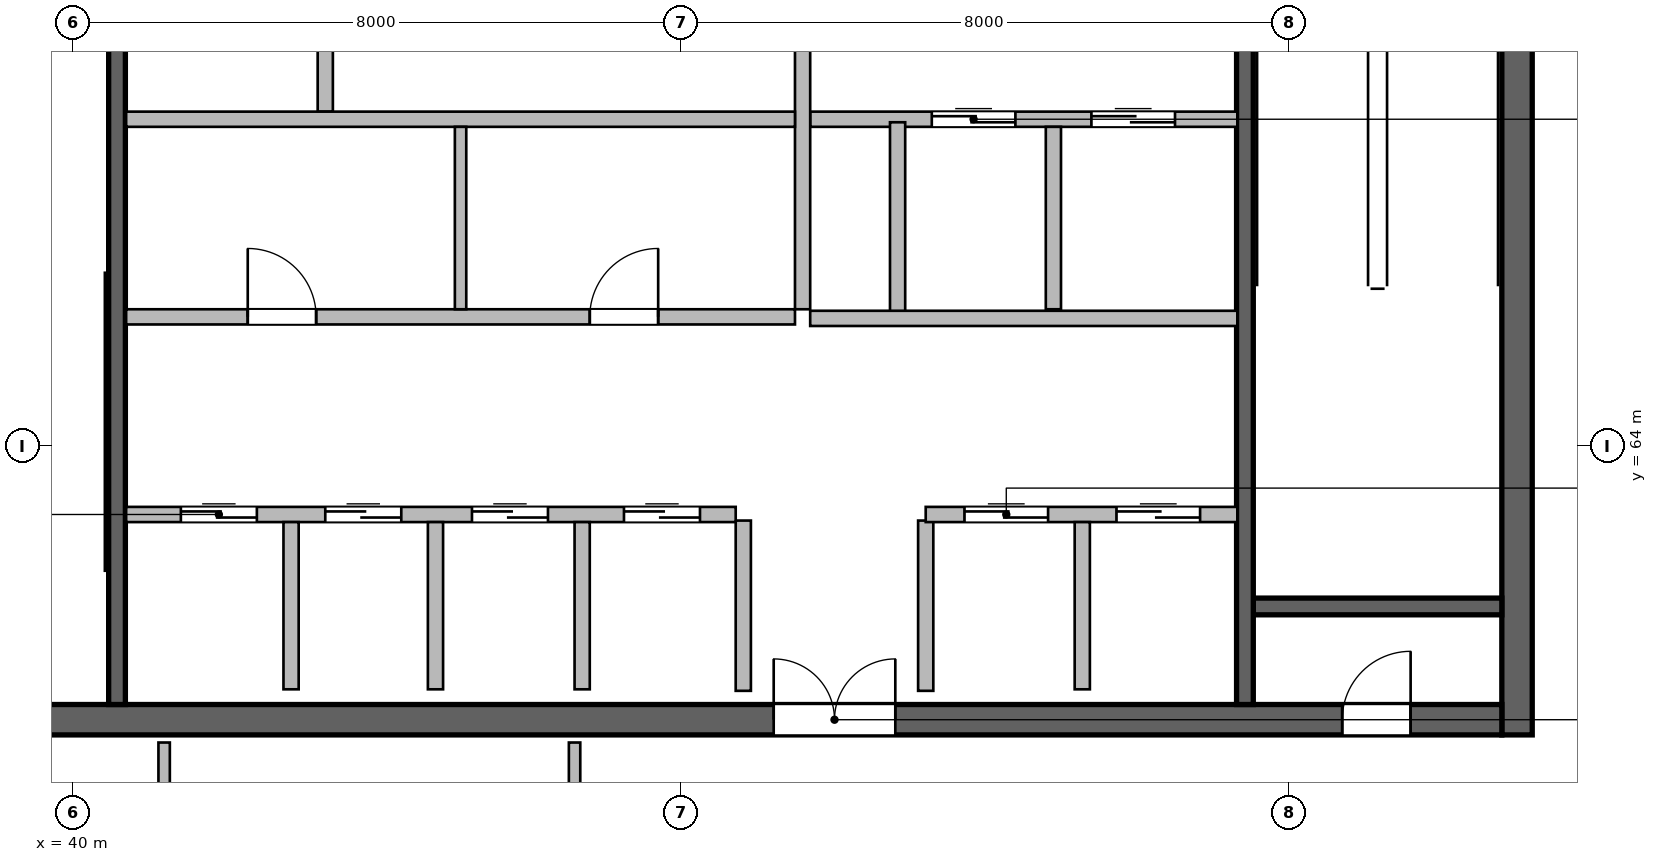
"""IFC4 building model, lengths in metres.
Left out: names, types, materials, properties, quantities, classifications, styles, units other than length and angle.
Written with IfcOpenShell. Run it as: python <this file> out.ifc"""

import sys

from ifc_helpers import new_model, si_unit, direction, frame, frame_2d, origin, place, context, subcontext, project, spatial, rectangle, extrude, source, transform, mapped, element, fill, save


model = new_model("IFC4")
c1 = context("Model", 3, precision=1e-05, world=origin(), true_north=direction((0.0, 1.0)))
c2 = subcontext(c1, "Body", "Model", "MODEL_VIEW")
j1 = project(units=[si_unit("LENGTHUNIT", "METRE"), si_unit("PLANEANGLEUNIT", "RADIAN")], contexts=[c1])
p1 = place(None, origin())
s1 = spatial("IfcSite", under=j1, at=p1, CompositionType="ELEMENT")
p2 = place(p1, origin())
s2 = spatial("IfcBuilding", under=s1, at=p2, CompositionType="ELEMENT")
p3 = place(p2, frame((0.0, 0.0, 312.6)))
s3 = spatial("IfcBuildingStorey", under=s2, at=p3, CompositionType="ELEMENT", Elevation=312.6)
m1 = source(origin(), c2, "Body", "SweptSolid", [
    extrude(rectangle(XDim=12.0, YDim=0.4, at=frame_2d((6.0, 0.0))), origin(), (0.0, 0.0, 1.0), 5.4),
])
p4 = place(p3, frame((59.0, 60.2, 0.0), z_axis=(0.0, 0.0, 1.0), x_axis=(0.0, 1.0, 0.0)))
e1 = element("IfcWall", 1, at=p4, inside=s3, PredefinedType="SHEAR", context=c2, shape_type="MappedRepresentation", body=[
    mapped(m1, transform((0.0, 0.0, 0.0), scale=1.0)),
])
m2 = source(origin(), c2, "Body", "SweptSolid", [
    extrude(rectangle(XDim=21.6, YDim=0.4, at=frame_2d((10.8, 0.0))), origin(), (0.0, 0.0, 1.0), 5.4),
])
p5 = place(p3, frame((37.2, 60.4, 0.0), z_axis=(0.0, 0.0, 1.0), x_axis=(1.0, 0.0, 0.0)))
e2 = element("IfcWall", 2, at=p5, inside=s3, PredefinedType="SHEAR", context=c2, shape_type="MappedRepresentation", body=[
    mapped(m2, transform((0.0, 0.0, 0.0), scale=1.0)),
])
p6 = place(p5, frame((1.1, 0.0, 0.0)))
e3 = element("IfcOpeningElement", 3, at=p6, cuts=e2, PredefinedType="OPENING", context=c2, shape_type="SweptSolid", body=[
    extrude(rectangle(XDim=1.15, YDim=2.15, at=frame_2d((0.575, 1.075))), frame((0.0, 0.21, 0.0), z_axis=(0.0, -1.0, 0.0), x_axis=(1.0, 0.0, 0.0)), (0.0, 0.0, 1.0), 0.42),
])
p7 = place(p5, frame((19.5, 0.0, 0.0)))
e4 = element("IfcOpeningElement", 4, at=p7, cuts=e2, PredefinedType="OPENING", context=c2, shape_type="SweptSolid", body=[
    extrude(rectangle(XDim=0.9, YDim=2.1, at=frame_2d((0.45, 1.05))), frame((0.0, 0.21, 0.0), z_axis=(0.0, -1.0, 0.0), x_axis=(1.0, 0.0, 0.0)), (0.0, 0.0, 1.0), 0.42),
])
p8 = place(p5, frame((12.02, 0.0, 0.0)))
e5 = element("IfcOpeningElement", 5, at=p8, cuts=e2, PredefinedType="OPENING", context=c2, shape_type="SweptSolid", body=[
    extrude(rectangle(XDim=1.6, YDim=2.15, at=frame_2d((0.8, 1.075))), frame((0.0, 0.21, 0.0), z_axis=(0.0, -1.0, 0.0), x_axis=(1.0, 0.0, 0.0)), (0.0, 0.0, 1.0), 0.42),
])
m3 = source(origin(), c2, "Body", "SweptSolid", [
    extrude(rectangle(XDim=3.27, YDim=0.22, at=frame_2d((1.635, 0.0))), origin(), (0.0, 0.0, 1.0), 5.4),
])
p9 = place(p3, frame((55.53, 61.89, 0.0), z_axis=(0.0, 0.0, 1.0), x_axis=(1.0, 0.0, 0.0)))
e6 = element("IfcWall", 6, at=p9, inside=s3, PredefinedType="SHEAR", context=c2, shape_type="MappedRepresentation", body=[
    mapped(m3, transform((0.0, 0.0, 0.0), scale=1.0)),
])
m4 = source(origin(), c2, "Body", "SweptSolid", [
    extrude(rectangle(XDim=11.2, YDim=0.22, at=frame_2d((5.6, 0.0))), origin(), (0.0, 0.0, 1.0), 5.4),
])
p10 = place(p3, frame((40.58, 60.6, 0.0), z_axis=(0.0, 0.0, 1.0), x_axis=(0.0, 1.0, 0.0)))
e7 = element("IfcWall", 7, at=p10, inside=s3, PredefinedType="SHEAR", context=c2, shape_type="MappedRepresentation", body=[
    mapped(m4, transform((0.0, 0.0, 0.0), scale=1.0)),
])
p11 = place(p3, frame((55.42, 60.6, 0.0), z_axis=(0.0, 0.0, 1.0), x_axis=(0.0, 1.0, 0.0)))
e8 = element("IfcWall", 8, at=p11, inside=s3, PredefinedType="SHEAR", context=c2, shape_type="MappedRepresentation", body=[
    mapped(m4, transform((0.0, 0.0, 0.0), scale=1.0)),
])
p12 = place(p11, frame((9.645, 0.0, 0.0)))
e9 = element("IfcOpeningElement", 9, at=p12, cuts=e8, PredefinedType="OPENING", context=c2, shape_type="SweptSolid", body=[
    extrude(rectangle(XDim=1.15, YDim=2.15, at=frame_2d((0.575, 1.075))), frame((0.0, 0.12, 0.0), z_axis=(0.0, -1.0, 0.0), x_axis=(1.0, 0.0, 0.0)), (0.0, 0.0, 1.0), 0.24),
])
m5 = source(origin(), c2, "Body", "SweptSolid", [
    extrude(rectangle(XDim=2.24, YDim=0.2, at=frame_2d((1.12, 0.0))), origin(), (0.0, 0.0, 1.0), 5.12),
])
for number, where, z_axis, x_axis in (
    (10, (48.82, 60.78, 0.0), (0.0, 0.0, 1.0), (0.0, 1.0, 0.0)),
    (11, (51.22, 60.78, 0.0), (0.0, 0.0, 1.0), (0.0, 1.0, 0.0)),
):
    element("IfcWall", number, at=place(p3, frame(where, z_axis=z_axis, x_axis=x_axis)), inside=s3, PredefinedType="SOLIDWALL", context=c2, shape_type="MappedRepresentation", body=[
        mapped(m5, transform((0.0, 0.0, 0.0), scale=1.0)),
    ])
m6 = source(origin(), c2, "Body", "SweptSolid", [
    extrude(rectangle(XDim=5.62, YDim=0.2, at=frame_2d((2.81, 0.0))), origin(), (0.0, 0.0, 1.0), 5.12),
])
p13 = place(p3, frame((49.7, 68.3, 0.0), z_axis=(0.0, 0.0, 1.0), x_axis=(1.0, 0.0, 0.0)))
e12 = element("IfcWall", 12, at=p13, inside=s3, PredefinedType="SOLIDWALL", context=c2, shape_type="MappedRepresentation", body=[
    mapped(m6, transform((0.0, 0.0, 0.0), scale=1.0)),
])
p14 = place(p13, frame((1.6, 0.0, 0.0)))
e13 = element("IfcOpeningElement", 13, at=p14, cuts=e12, PredefinedType="OPENING", context=c2, shape_type="SweptSolid", body=[
    extrude(rectangle(XDim=1.1, YDim=2.15, at=frame_2d((0.55, 1.075))), frame((0.0, 0.11, 0.0), z_axis=(0.0, -1.0, 0.0), x_axis=(1.0, 0.0, 0.0)), (0.0, 0.0, 1.0), 0.22),
])
p15 = place(p13, frame((3.7, 0.0, 0.0)))
e14 = element("IfcOpeningElement", 14, at=p15, cuts=e12, PredefinedType="OPENING", context=c2, shape_type="SweptSolid", body=[
    extrude(rectangle(XDim=1.1, YDim=2.15, at=frame_2d((0.55, 1.075))), frame((0.0, 0.11, 0.0), z_axis=(0.0, -1.0, 0.0), x_axis=(1.0, 0.0, 0.0)), (0.0, 0.0, 1.0), 0.22),
])
m7 = source(origin(), c2, "Body", "SweptSolid", [
    extrude(rectangle(XDim=5.8, YDim=0.2, at=frame_2d((2.9, 0.0))), origin(), (0.0, 0.0, 1.0), 5.12),
])
p16 = place(p3, frame((49.6, 65.8, 0.0), z_axis=(0.0, 0.0, 1.0), x_axis=(0.0, 1.0, 0.0)))
e15 = element("IfcWall", 15, at=p16, inside=s3, PredefinedType="SOLIDWALL", context=c2, shape_type="MappedRepresentation", body=[
    mapped(m7, transform((0.0, 0.0, 0.0), scale=1.0)),
])
m8 = source(origin(), c2, "Body", "SweptSolid", [
    extrude(rectangle(XDim=2.58, YDim=0.2, at=frame_2d((1.29, 0.0))), origin(), (0.0, 0.0, 1.0), 5.12),
])
p17 = place(p3, frame((50.85, 65.68, 0.0), z_axis=(0.0, 0.0, 1.0), x_axis=(0.0, 1.0, 0.0)))
e16 = element("IfcWall", 16, at=p17, inside=s3, PredefinedType="SOLIDWALL", context=c2, shape_type="MappedRepresentation", body=[
    mapped(m8, transform((0.0, 0.0, 0.0), scale=1.0)),
])
m9 = source(origin(), c2, "Body", "SweptSolid", [
    extrude(rectangle(XDim=2.4, YDim=0.2, at=frame_2d((1.2, 0.0))), origin(), (0.0, 0.0, 1.0), 5.12),
])
p18 = place(p3, frame((52.9, 65.8, 0.0), z_axis=(0.0, 0.0, 1.0), x_axis=(0.0, 1.0, 0.0)))
e17 = element("IfcWall", 17, at=p18, inside=s3, PredefinedType="SOLIDWALL", context=c2, shape_type="MappedRepresentation", body=[
    mapped(m9, transform((0.0, 0.0, 0.0), scale=1.0)),
])
p19 = place(p3, frame((49.7, 65.68, 0.0), z_axis=(0.0, 0.0, 1.0), x_axis=(1.0, 0.0, 0.0)))
e18 = element("IfcWall", 18, at=p19, inside=s3, PredefinedType="SOLIDWALL", context=c2, shape_type="MappedRepresentation", body=[
    mapped(m6, transform((0.0, 0.0, 0.0), scale=1.0)),
])
m10 = source(origin(), c2, "Body", "SweptSolid", [
    extrude(rectangle(XDim=3.2, YDim=0.2, at=frame_2d((1.6, 0.0))), origin(), (0.0, 0.0, 1.0), 5.12),
])
p20 = place(p3, frame((43.32, 68.4, 0.0), z_axis=(0.0, 0.0, 1.0), x_axis=(0.0, 1.0, 0.0)))
e19 = element("IfcWall", 19, at=p20, inside=s3, PredefinedType="SOLIDWALL", context=c2, shape_type="MappedRepresentation", body=[
    mapped(m10, transform((0.0, 0.0, 0.0), scale=1.0)),
])
m11 = source(origin(), c2, "Body", "SweptSolid", [
    extrude(rectangle(XDim=8.8, YDim=0.2, at=frame_2d((4.4, 0.0))), origin(), (0.0, 0.0, 1.0), 5.12),
])
p21 = place(p3, frame((40.7, 68.3, 0.0), z_axis=(0.0, 0.0, 1.0), x_axis=(1.0, 0.0, 0.0)))
e20 = element("IfcWall", 20, at=p21, inside=s3, PredefinedType="SOLIDWALL", context=c2, shape_type="MappedRepresentation", body=[
    mapped(m11, transform((0.0, 0.0, 0.0), scale=1.0)),
])
m12 = source(origin(), c2, "Body", "SweptSolid", [
    extrude(rectangle(XDim=8.02, YDim=0.2, at=frame_2d((4.01, 0.0))), origin(), (0.0, 0.0, 1.0), 5.12),
])
p22 = place(p3, frame((40.7, 63.1, 0.0), z_axis=(0.0, 0.0, 1.0), x_axis=(1.0, 0.0, 0.0)))
e21 = element("IfcWall", 21, at=p22, inside=s3, PredefinedType="SOLIDWALL", context=c2, shape_type="MappedRepresentation", body=[
    mapped(m12, transform((0.0, 0.0, 0.0), scale=1.0)),
])
p23 = place(p22, frame((0.72, 0.0, 0.0)))
e22 = element("IfcOpeningElement", 22, at=p23, cuts=e21, PredefinedType="OPENING", context=c2, shape_type="SweptSolid", body=[
    extrude(rectangle(XDim=1.0, YDim=2.15, at=frame_2d((0.5, 1.075))), frame((0.0, 0.11, 0.0), z_axis=(0.0, -1.0, 0.0), x_axis=(1.0, 0.0, 0.0)), (0.0, 0.0, 1.0), 0.22),
])
p24 = place(p22, frame((2.62, 0.0, 0.0)))
e23 = element("IfcOpeningElement", 23, at=p24, cuts=e21, PredefinedType="OPENING", context=c2, shape_type="SweptSolid", body=[
    extrude(rectangle(XDim=1.0, YDim=2.15, at=frame_2d((0.5, 1.075))), frame((0.0, 0.11, 0.0), z_axis=(0.0, -1.0, 0.0), x_axis=(1.0, 0.0, 0.0)), (0.0, 0.0, 1.0), 0.22),
])
p25 = place(p22, frame((4.55, 0.0, 0.0)))
e24 = element("IfcOpeningElement", 24, at=p25, cuts=e21, PredefinedType="OPENING", context=c2, shape_type="SweptSolid", body=[
    extrude(rectangle(XDim=1.0, YDim=2.15, at=frame_2d((0.5, 1.075))), frame((0.0, 0.11, 0.0), z_axis=(0.0, -1.0, 0.0), x_axis=(1.0, 0.0, 0.0)), (0.0, 0.0, 1.0), 0.22),
])
p26 = place(p22, frame((6.55, 0.0, 0.0)))
e25 = element("IfcOpeningElement", 25, at=p26, cuts=e21, PredefinedType="OPENING", context=c2, shape_type="SweptSolid", body=[
    extrude(rectangle(XDim=1.0, YDim=2.15, at=frame_2d((0.5, 1.075))), frame((0.0, 0.11, 0.0), z_axis=(0.0, -1.0, 0.0), x_axis=(1.0, 0.0, 0.0)), (0.0, 0.0, 1.0), 0.22),
])
m13 = source(origin(), c2, "Body", "SweptSolid", [
    extrude(rectangle(XDim=4.1, YDim=0.2, at=frame_2d((2.05, 0.0))), origin(), (0.0, 0.0, 1.0), 5.12),
])
p27 = place(p3, frame((51.22, 63.1, 0.0), z_axis=(0.0, 0.0, 1.0), x_axis=(1.0, 0.0, 0.0)))
e26 = element("IfcWall", 26, at=p27, inside=s3, PredefinedType="SOLIDWALL", context=c2, shape_type="MappedRepresentation", body=[
    mapped(m13, transform((0.0, 0.0, 0.0), scale=1.0)),
])
p28 = place(p27, frame((0.51, 0.0, 0.0)))
e27 = element("IfcOpeningElement", 27, at=p28, cuts=e26, PredefinedType="OPENING", context=c2, shape_type="SweptSolid", body=[
    extrude(rectangle(XDim=1.1, YDim=2.15, at=frame_2d((0.55, 1.075))), frame((0.0, 0.11, 0.0), z_axis=(0.0, -1.0, 0.0), x_axis=(1.0, 0.0, 0.0)), (0.0, 0.0, 1.0), 0.22),
])
p29 = place(p27, frame((2.51, 0.0, 0.0)))
e28 = element("IfcOpeningElement", 28, at=p29, cuts=e26, PredefinedType="OPENING", context=c2, shape_type="SweptSolid", body=[
    extrude(rectangle(XDim=1.1, YDim=2.15, at=frame_2d((0.55, 1.075))), frame((0.0, 0.11, 0.0), z_axis=(0.0, -1.0, 0.0), x_axis=(1.0, 0.0, 0.0)), (0.0, 0.0, 1.0), 0.22),
])
m14 = source(origin(), c2, "Body", "SweptSolid", [
    extrude(rectangle(XDim=2.2, YDim=0.2, at=frame_2d((1.1, 0.0))), origin(), (0.0, 0.0, 1.0), 5.12),
])
for number, where, z_axis, x_axis in (
    (29, (42.87, 60.8, 0.0), (0.0, 0.0, 1.0), (0.0, 1.0, 0.0)),
    (30, (44.77, 60.8, 0.0), (0.0, 0.0, 1.0), (0.0, 1.0, 0.0)),
    (31, (46.7, 60.8, 0.0), (0.0, 0.0, 1.0), (0.0, 1.0, 0.0)),
    (32, (53.28, 60.8, 0.0), (0.0, 0.0, 1.0), (0.0, 1.0, 0.0)),
):
    element("IfcWall", number, at=place(p3, frame(where, z_axis=z_axis, x_axis=x_axis)), inside=s3, PredefinedType="SOLIDWALL", context=c2, shape_type="MappedRepresentation", body=[
        mapped(m14, transform((0.0, 0.0, 0.0), scale=1.0)),
    ])
p30 = place(p3, frame((40.7, 65.7, 0.0), z_axis=(0.0, 0.0, 1.0), x_axis=(1.0, 0.0, 0.0)))
e33 = element("IfcWall", 33, at=p30, inside=s3, PredefinedType="SOLIDWALL", context=c2, shape_type="MappedRepresentation", body=[
    mapped(m11, transform((0.0, 0.0, 0.0), scale=1.0)),
])
p31 = place(p30, frame((1.6, 0.0, 0.0)))
e34 = element("IfcOpeningElement", 34, at=p31, cuts=e33, PredefinedType="OPENING", context=c2, shape_type="SweptSolid", body=[
    extrude(rectangle(XDim=0.9, YDim=2.1, at=frame_2d((0.45, 1.05))), frame((0.0, 0.11, 0.0), z_axis=(0.0, -1.0, 0.0), x_axis=(1.0, 0.0, 0.0)), (0.0, 0.0, 1.0), 0.22),
])
p32 = place(p30, frame((6.1, 0.0, 0.0)))
e35 = element("IfcOpeningElement", 35, at=p32, cuts=e33, PredefinedType="OPENING", context=c2, shape_type="SweptSolid", body=[
    extrude(rectangle(XDim=0.9, YDim=2.1, at=frame_2d((0.45, 1.05))), frame((0.0, 0.11, 0.0), z_axis=(0.0, -1.0, 0.0), x_axis=(1.0, 0.0, 0.0)), (0.0, 0.0, 1.0), 0.22),
])
m15 = source(origin(), c2, "Body", "SweptSolid", [
    extrude(rectangle(XDim=2.4, YDim=0.15, at=frame_2d((1.2, 0.0))), origin(), (0.0, 0.0, 1.0), 5.12),
])
p33 = place(p3, frame((45.1, 65.8, 0.0), z_axis=(0.0, 0.0, 1.0), x_axis=(0.0, 1.0, 0.0)))
e36 = element("IfcWall", 36, at=p33, inside=s3, PredefinedType="PARTITIONING", context=c2, shape_type="MappedRepresentation", body=[
    mapped(m15, transform((0.0, 0.0, 0.0), scale=1.0)),
])
m16 = source(origin(), c2, "Body", "SweptSolid", [
    extrude(rectangle(XDim=2.033, YDim=0.15, at=frame_2d((1.016, 0.0))), origin(), (0.0, 0.0, 1.0), 5.12),
])
p34 = place(p3, frame((41.2, 58.067, 0.0), z_axis=(0.0, 0.0, 1.0), x_axis=(0.0, 1.0, 0.0)))
e37 = element("IfcWall", 37, at=p34, inside=s3, PredefinedType="PARTITIONING", context=c2, shape_type="MappedRepresentation", body=[
    mapped(m16, transform((0.0, 0.0, 0.0), scale=1.0)),
])
p35 = place(p34, frame((0.591, 0.0, 0.0)))
e38 = element("IfcOpeningElement", 38, at=p35, cuts=e37, PredefinedType="OPENING", context=c2, shape_type="SweptSolid", body=[
    extrude(rectangle(XDim=0.85, YDim=2.1, at=frame_2d((0.425, 1.05))), frame((0.0, 0.085, 0.0), z_axis=(0.0, -1.0, 0.0), x_axis=(1.0, 0.0, 0.0)), (0.0, 0.0, 1.0), 0.17),
])
p36 = place(p3, frame((46.6, 58.067, 0.0), z_axis=(0.0, 0.0, 1.0), x_axis=(0.0, 1.0, 0.0)))
e39 = element("IfcWall", 39, at=p36, inside=s3, PredefinedType="PARTITIONING", context=c2, shape_type="MappedRepresentation", body=[
    mapped(m16, transform((0.0, 0.0, 0.0), scale=1.0)),
])
m17 = source(origin(), c2, "Body", "SweptSolid", [
    extrude(rectangle(XDim=0.9, YDim=2.1, at=frame_2d((0.45, 1.05))), frame((0.0, 0.025, 0.0), z_axis=(0.0, -1.0, 0.0), x_axis=(1.0, 0.0, 0.0)), (0.0, 0.0, 1.0), 0.05),
])
p37 = place(p7, origin())
e40 = element("IfcDoor", 40, at=p37, inside=s3, OperationType="SINGLE_SWING_RIGHT", PredefinedType="DOOR", context=c2, shape_type="MappedRepresentation", body=[
    mapped(m17, transform((0.0, 0.0, 0.0), scale=1.0)),
])
fill(e4, e40)
m18 = source(origin(), c2, "Body", "SweptSolid", [
    extrude(rectangle(XDim=1.6, YDim=2.15, at=frame_2d((0.8, 1.075))), frame((0.0, 0.025, 0.0), z_axis=(0.0, -1.0, 0.0), x_axis=(1.0, 0.0, 0.0)), (0.0, 0.0, 1.0), 0.05),
])
p38 = place(p8, origin())
e41 = element("IfcDoor", 41, at=p38, inside=s3, OperationType="DOUBLE_DOOR_SINGLE_SWING", PredefinedType="DOOR", context=c2, shape_type="MappedRepresentation", body=[
    mapped(m18, transform((0.0, 0.0, 0.0), scale=1.0)),
])
fill(e5, e41)
m19 = source(origin(), c2, "Body", "SweptSolid", [
    extrude(rectangle(XDim=1.1, YDim=2.15, at=frame_2d((0.55, 1.075))), frame((0.0, 0.025, 0.0), z_axis=(0.0, -1.0, 0.0), x_axis=(1.0, 0.0, 0.0)), (0.0, 0.0, 1.0), 0.05),
])
p39 = place(p14, origin())
e42 = element("IfcDoor", 42, at=p39, inside=s3, OperationType="DOUBLE_DOOR_SLIDING", PredefinedType="DOOR", context=c2, shape_type="MappedRepresentation", body=[
    mapped(m19, transform((0.0, 0.0, 0.0), scale=1.0)),
])
fill(e13, e42)
p40 = place(p15, origin())
e43 = element("IfcDoor", 43, at=p40, inside=s3, OperationType="DOUBLE_DOOR_SLIDING", PredefinedType="DOOR", context=c2, shape_type="MappedRepresentation", body=[
    mapped(m19, transform((0.0, 0.0, 0.0), scale=1.0)),
])
fill(e14, e43)
m20 = source(origin(), c2, "Body", "SweptSolid", [
    extrude(rectangle(XDim=1.0, YDim=2.15, at=frame_2d((0.5, 1.075))), frame((0.0, 0.025, 0.0), z_axis=(0.0, -1.0, 0.0), x_axis=(1.0, 0.0, 0.0)), (0.0, 0.0, 1.0), 0.05),
])
p41 = place(p23, origin())
e44 = element("IfcDoor", 44, at=p41, inside=s3, OperationType="DOUBLE_DOOR_SLIDING", PredefinedType="DOOR", context=c2, shape_type="MappedRepresentation", body=[
    mapped(m20, transform((0.0, 0.0, 0.0), scale=1.0)),
])
fill(e22, e44)
p42 = place(p24, origin())
e45 = element("IfcDoor", 45, at=p42, inside=s3, OperationType="DOUBLE_DOOR_SLIDING", PredefinedType="DOOR", context=c2, shape_type="MappedRepresentation", body=[
    mapped(m20, transform((0.0, 0.0, 0.0), scale=1.0)),
])
fill(e23, e45)
p43 = place(p25, origin())
e46 = element("IfcDoor", 46, at=p43, inside=s3, OperationType="DOUBLE_DOOR_SLIDING", PredefinedType="DOOR", context=c2, shape_type="MappedRepresentation", body=[
    mapped(m20, transform((0.0, 0.0, 0.0), scale=1.0)),
])
fill(e24, e46)
p44 = place(p26, origin())
e47 = element("IfcDoor", 47, at=p44, inside=s3, OperationType="DOUBLE_DOOR_SLIDING", PredefinedType="DOOR", context=c2, shape_type="MappedRepresentation", body=[
    mapped(m20, transform((0.0, 0.0, 0.0), scale=1.0)),
])
fill(e25, e47)
m21 = source(origin(), c2, "Body", "SweptSolid", [
    extrude(rectangle(XDim=1.1, YDim=2.15, at=frame_2d((0.55, 1.075))), frame((0.0, 0.025, 0.0), z_axis=(0.0, -1.0, 0.0), x_axis=(1.0, 0.0, 0.0)), (0.0, 0.0, 1.0), 0.05),
])
p45 = place(p28, origin())
e48 = element("IfcDoor", 48, at=p45, inside=s3, OperationType="DOUBLE_DOOR_SLIDING", PredefinedType="DOOR", context=c2, shape_type="MappedRepresentation", body=[
    mapped(m21, transform((0.0, 0.0, 0.0), scale=1.0)),
])
fill(e27, e48)
p46 = place(p29, origin())
e49 = element("IfcDoor", 49, at=p46, inside=s3, OperationType="DOUBLE_DOOR_SLIDING", PredefinedType="DOOR", context=c2, shape_type="MappedRepresentation", body=[
    mapped(m21, transform((0.0, 0.0, 0.0), scale=1.0)),
])
fill(e28, e49)
p47 = place(p31, origin())
e50 = element("IfcDoor", 50, at=p47, inside=s3, OperationType="SINGLE_SWING_LEFT", PredefinedType="DOOR", context=c2, shape_type="MappedRepresentation", body=[
    mapped(m17, transform((0.0, 0.0, 0.0), scale=1.0)),
])
fill(e34, e50)
p48 = place(p32, origin())
e51 = element("IfcDoor", 51, at=p48, inside=s3, OperationType="SINGLE_SWING_RIGHT", PredefinedType="DOOR", context=c2, shape_type="MappedRepresentation", body=[
    mapped(m17, transform((0.0, 0.0, 0.0), scale=1.0)),
])
fill(e35, e51)
save(model, sys.argv[1])
